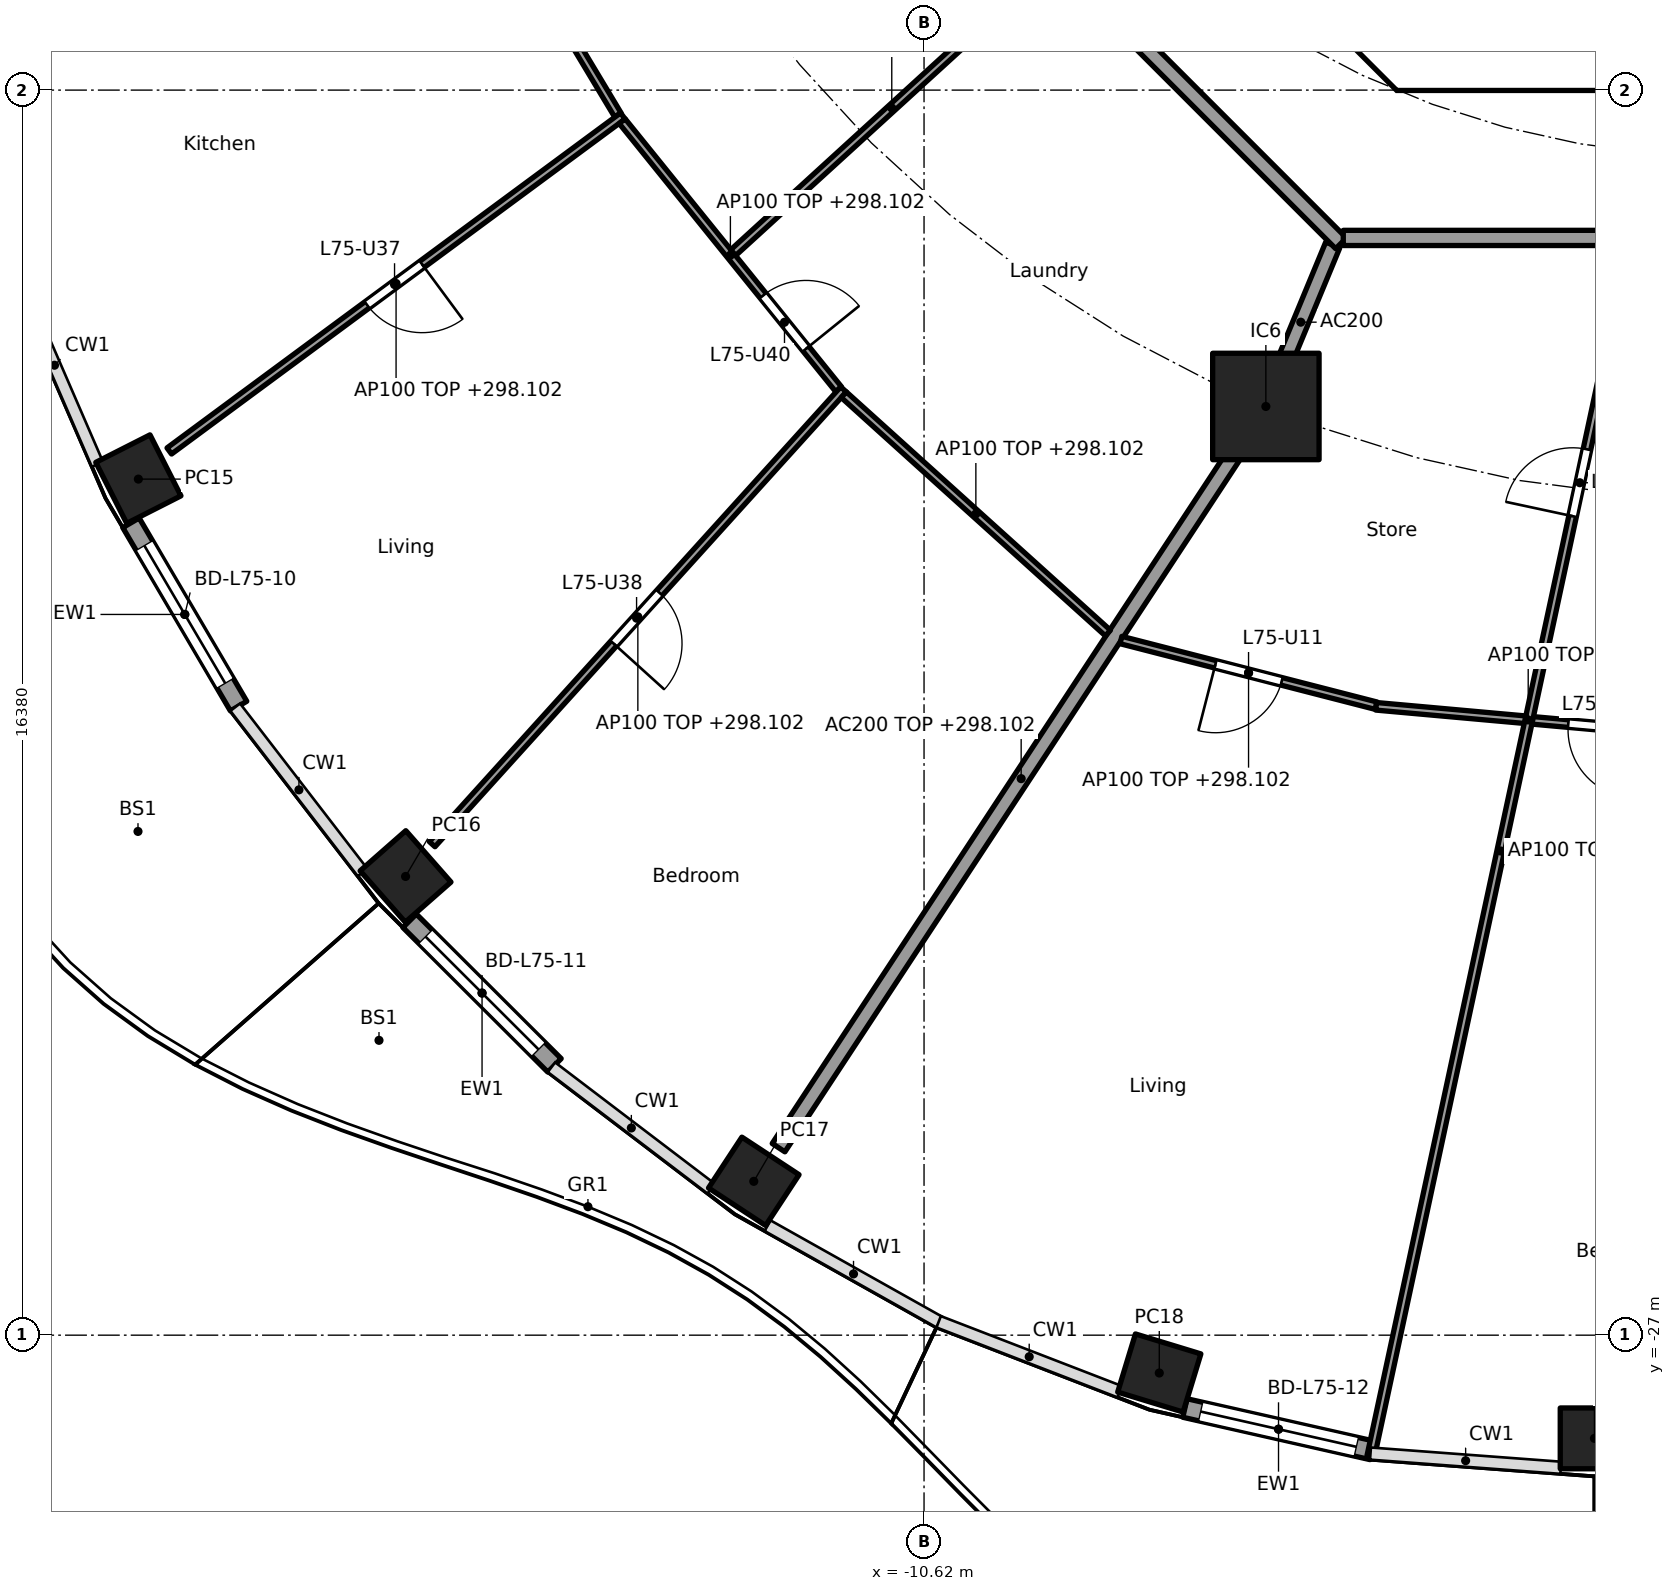
"""IFC4 building model, lengths in metres.
Left out: names, types, materials, properties, quantities, classifications, styles, units other than length and angle.
Written with IfcOpenShell. Run it as: python <this file> out.ifc"""

import sys

from ifc_helpers import new_model, si_unit, direction, frame, frame_2d, origin, origin_2d, place, context, subcontext, project, spatial, polyline, rectangle, hollow_rectangle, outline, extrude, element, fill, save


model = new_model("IFC4")
c1 = context("Model", 3, precision=1e-05, world=origin(), true_north=direction((0.0, 1.0)))
c2 = subcontext(c1, "Body", "Model", "MODEL_VIEW")
j1 = project(units=[si_unit("LENGTHUNIT", "METRE"), si_unit("PLANEANGLEUNIT", "RADIAN")], contexts=[c1])
p1 = place(None, origin())
s1 = spatial("IfcSite", under=j1, at=p1, CompositionType="ELEMENT")
p2 = place(p1, origin())
s2 = spatial("IfcBuilding", under=s1, at=p2, CompositionType="ELEMENT")
p3 = place(p2, frame((0.0, 0.0, 295.5)))
s3 = spatial("IfcBuildingStorey", under=s2, at=p3, CompositionType="ELEMENT", Elevation=295.5)
for number, where, z_axis, x_axis in (
    (1, (-20.957, -15.738, 0.0), (0.0, 0.0, 1.0), (0.452, -0.892, 0.0)),
    (2, (-17.441, -20.965, 0.0), (0.0, 0.0, 1.0), (0.66, -0.751, 0.0)),
    (3, (-12.86, -24.976, 0.0), (0.0, 0.0, 1.0), (0.836, -0.549, 0.0)),
    (4, (-7.525, -27.498, 0.0), (0.0, 0.0, 1.0), (0.957, -0.292, 0.0)),
    (5, (-1.8, -28.358, 0.0), (0.0, 0.0, 1.0), (1.0, 0.0, 0.0)),
):
    element("IfcColumn", number, at=place(p3, frame(where, z_axis=z_axis, x_axis=x_axis)), inside=s3, PredefinedType="COLUMN", context=c2, shape_type="SweptSolid", body=[
        extrude(hollow_rectangle(XDim=0.9, YDim=0.8, WallThickness=0.028, at=origin_2d()), origin(), (0.0, 0.0, 1.0), 3.7),
    ])
p4 = place(p3, frame((-6.123, -14.782, 0.0), z_axis=(0.0, 0.0, 1.0), x_axis=(1.0, 0.0, 0.0)))
e6 = element("IfcColumn", 6, at=p4, inside=s3, PredefinedType="COLUMN", context=c2, shape_type="SweptSolid", body=[
    extrude(rectangle(XDim=1.4, YDim=1.4, at=origin_2d()), origin(), (0.0, 0.0, 1.0), 3.7),
])
p5 = place(p3, frame((-19.638, -18.724, 0.0), z_axis=(0.0, 0.0, 1.0), x_axis=(-0.506371364425, 0.862315511452, 0.0)))
e7 = element("IfcWall", 7, at=p5, inside=s3, PredefinedType="SOLIDWALL", context=c2, shape_type="SweptSolid", body=[
    extrude(rectangle(XDim=2.796, YDim=0.25, at=frame_2d((1.398, 0.0))), origin(), (0.0, 0.0, 1.0), 3.28),
])
p6 = place(p5, frame((0.348, 0.0, 0.0)))
e8 = element("IfcOpeningElement", 8, at=p6, cuts=e7, PredefinedType="OPENING", context=c2, shape_type="SweptSolid", body=[
    extrude(rectangle(XDim=2.1, YDim=2.4, at=frame_2d((1.05, 1.2))), frame((0.0, 0.135, 0.0), z_axis=(0.0, -1.0, 0.0), x_axis=(1.0, 0.0, 0.0)), (0.0, 0.0, 1.0), 0.27),
])
p7 = place(p3, frame((-15.482, -23.45, 0.0), z_axis=(0.0, 0.0, 1.0), x_axis=(-0.707831739508, 0.706381078841, 0.0)))
e9 = element("IfcWall", 9, at=p7, inside=s3, PredefinedType="SOLIDWALL", context=c2, shape_type="SweptSolid", body=[
    extrude(rectangle(XDim=2.693, YDim=0.25, at=frame_2d((1.346, 0.0))), origin(), (0.0, 0.0, 1.0), 3.28),
])
p8 = place(p7, frame((0.296, 0.0, 0.0)))
e10 = element("IfcOpeningElement", 10, at=p8, cuts=e9, PredefinedType="OPENING", context=c2, shape_type="SweptSolid", body=[
    extrude(rectangle(XDim=2.1, YDim=2.4, at=frame_2d((1.05, 1.2))), frame((0.0, 0.135, 0.0), z_axis=(0.0, -1.0, 0.0), x_axis=(1.0, 0.0, 0.0)), (0.0, 0.0, 1.0), 0.27),
])
p9 = place(p3, frame((-4.725, -28.516, 0.0), z_axis=(0.0, 0.0, 1.0), x_axis=(-0.975319584032, 0.220797891756, 0.0)))
e11 = element("IfcWall", 11, at=p9, inside=s3, PredefinedType="SOLIDWALL", context=c2, shape_type="SweptSolid", body=[
    extrude(rectangle(XDim=2.525, YDim=0.25, at=frame_2d((1.263, 0.0))), origin(), (0.0, 0.0, 1.0), 3.28),
])
p10 = place(p9, frame((0.213, 0.0, 0.0)))
e12 = element("IfcOpeningElement", 12, at=p10, cuts=e11, PredefinedType="OPENING", context=c2, shape_type="SweptSolid", body=[
    extrude(rectangle(XDim=2.1, YDim=2.4, at=frame_2d((1.05, 1.2))), frame((0.0, 0.135, 0.0), z_axis=(0.0, -1.0, 0.0), x_axis=(1.0, 0.0, 0.0)), (0.0, 0.0, 1.0), 0.27),
])
p11 = place(p3, frame((-9.988, -4.613, 0.0), z_axis=(0.0, 0.0, 1.0), x_axis=(0.707106781187, -0.707106781187, 0.0)))
e13 = element("IfcWall", 13, at=p11, inside=s3, PredefinedType="SHEAR", context=c2, shape_type="SweptSolid", body=[
    extrude(rectangle(XDim=7.602, YDim=0.6, at=frame_2d((3.801, 0.0))), origin(), (0.0, 0.0, 1.0), 3.28),
])
p12 = place(p11, frame((6.151, 0.0, 0.0)))
e14 = element("IfcOpeningElement", 14, at=p12, cuts=e13, PredefinedType="OPENING", context=c2, shape_type="SweptSolid", body=[
    extrude(rectangle(XDim=1.1, YDim=2.1, at=frame_2d((0.55, 1.05))), frame((0.0, 0.31, 0.0), z_axis=(0.0, -1.0, 0.0), x_axis=(1.0, 0.0, 0.0)), (0.0, 0.0, 1.0), 0.62),
])
p13 = place(p3, origin())
e15 = element("IfcWall", 15, at=p13, inside=s3, PredefinedType="SHEAR", context=c2, shape_type="SweptSolid", body=[
    extrude(outline(polyline([(-4.152, -10.025), (4.152, -10.025), (4.401, -9.776), (4.825, -10.2), (4.401, -10.625), (-4.401, -10.625), (-4.825, -10.2), (-4.401, -9.776), (-4.152, -10.025)])), origin(), (0.0, 0.0, 1.0), 3.28),
])
p14 = place(p3, frame((-5.243, -12.657, 0.0), z_axis=(0.0, 0.0, 1.0), x_axis=(-0.382770106157, -0.923843626288, 0.0)))
e16 = element("IfcWall", 16, at=p14, inside=s3, PredefinedType="PARTITIONING", context=c2, shape_type="SweptSolid", body=[
    extrude(rectangle(XDim=2.199, YDim=0.2, at=frame_2d((1.1, 0.0))), origin(), (0.0, 0.0, 1.0), 3.28),
])
p15 = place(p3, frame((-6.151, -14.824, 0.0), z_axis=(0.0, 0.0, 1.0), x_axis=(-0.549345577828, -0.835595258556, 0.0)))
e17 = element("IfcWall", 17, at=p15, inside=s3, PredefinedType="PARTITIONING", context=c2, shape_type="SweptSolid", body=[
    extrude(rectangle(XDim=11.62, YDim=0.2, at=frame_2d((5.81, 0.0))), origin(), (0.0, 0.0, 1.0), 2.602),
])
p16 = place(p3, frame((-12.635, -5.134, 0.0), z_axis=(0.0, 0.0, 1.0), x_axis=(0.707106781187, -0.707106781187, 0.0)))
e18 = element("IfcWall", 18, at=p16, inside=s3, PredefinedType="PARTITIONING", context=c2, shape_type="SweptSolid", body=[
    extrude(rectangle(XDim=10.609, YDim=0.2, at=frame_2d((5.305, 0.0))), origin(), (0.0, 0.0, 1.0), 3.28),
])
p17 = place(p3, frame((-5.104, -12.565, 0.0), z_axis=(0.0, 0.0, 1.0), x_axis=(1.0, 0.0, 0.0)))
e19 = element("IfcWall", 19, at=p17, inside=s3, PredefinedType="PARTITIONING", context=c2, shape_type="SweptSolid", body=[
    extrude(rectangle(XDim=10.409, YDim=0.2, at=frame_2d((5.205, 0.0))), origin(), (0.0, 0.0, 1.0), 3.28),
])
p18 = place(p3, frame((-16.972, -7.08, 0.0), z_axis=(0.0, 0.0, 1.0), x_axis=(0.514989049311, -0.857196756346, 0.0)))
e20 = element("IfcWall", 20, at=p18, inside=s3, PredefinedType="PARTITIONING", context=c2, shape_type="SweptSolid", body=[
    extrude(rectangle(XDim=4.512, YDim=0.1, at=frame_2d((2.256, 0.0))), origin(), (0.0, 0.0, 1.0), 2.602),
])
p19 = place(p18, frame((1.806, 0.0, 0.0)))
e21 = element("IfcOpeningElement", 21, at=p19, cuts=e20, PredefinedType="OPENING", context=c2, shape_type="SweptSolid", body=[
    extrude(rectangle(XDim=0.9, YDim=2.1, at=frame_2d((0.45, 1.05))), frame((0.0, 0.06, 0.0), z_axis=(0.0, -1.0, 0.0), x_axis=(1.0, 0.0, 0.0)), (0.0, 0.0, 1.0), 0.12),
])
p20 = place(p3, frame((-14.582, -10.96, 0.0), z_axis=(0.0, 0.0, 1.0), x_axis=(-0.804405200554, -0.594081032623, 0.0)))
e22 = element("IfcWall", 22, at=p20, inside=s3, PredefinedType="PARTITIONING", context=c2, shape_type="SweptSolid", body=[
    extrude(rectangle(XDim=7.418, YDim=0.1, at=frame_2d((3.709, 0.0))), origin(), (0.0, 0.0, 1.0), 2.602),
])
p21 = place(p20, frame((3.284, 0.0, 0.0)))
e23 = element("IfcOpeningElement", 23, at=p21, cuts=e22, PredefinedType="OPENING", context=c2, shape_type="SweptSolid", body=[
    extrude(rectangle(XDim=0.9, YDim=2.1, at=frame_2d((0.45, 1.05))), frame((0.0, 0.06, 0.0), z_axis=(0.0, -1.0, 0.0), x_axis=(1.0, 0.0, 0.0)), (0.0, 0.0, 1.0), 0.12),
])
p22 = place(p3, frame((-14.591, -11.029, 0.0), z_axis=(0.0, 0.0, 1.0), x_axis=(0.628170338674, -0.778075848237, 0.0)))
e24 = element("IfcWall", 24, at=p22, inside=s3, PredefinedType="PARTITIONING", context=c2, shape_type="SweptSolid", body=[
    extrude(rectangle(XDim=4.532, YDim=0.1, at=frame_2d((2.266, 0.0))), origin(), (0.0, 0.0, 1.0), 2.602),
])
p23 = place(p22, frame((2.949, 0.0, 0.0)))
e25 = element("IfcOpeningElement", 25, at=p23, cuts=e24, PredefinedType="OPENING", context=c2, shape_type="SweptSolid", body=[
    extrude(rectangle(XDim=0.9, YDim=2.1, at=frame_2d((0.45, 1.05))), frame((0.0, 0.06, 0.0), z_axis=(0.0, -1.0, 0.0), x_axis=(1.0, 0.0, 0.0)), (0.0, 0.0, 1.0), 0.12),
])
p24 = place(p3, frame((-8.958, -8.952, 0.0), z_axis=(0.0, 0.0, 1.0), x_axis=(-0.73876526954, -0.673962815385, 0.0)))
e26 = element("IfcWall", 26, at=p24, inside=s3, PredefinedType="PARTITIONING", context=c2, shape_type="SweptSolid", body=[
    extrude(rectangle(XDim=5.647, YDim=0.1, at=frame_2d((2.824, 0.0))), origin(), (0.0, 0.0, 1.0), 2.527),
])
p25 = place(p3, frame((-11.679, -14.557, 0.0), z_axis=(0.0, 0.0, 1.0), x_axis=(-0.670800011545, -0.741638284146, 0.0)))
e27 = element("IfcWall", 27, at=p25, inside=s3, PredefinedType="PARTITIONING", context=c2, shape_type="SweptSolid", body=[
    extrude(rectangle(XDim=8.068, YDim=0.1, at=frame_2d((4.034, 0.0))), origin(), (0.0, 0.0, 1.0), 2.602),
])
p26 = place(p25, frame((3.609, 0.0, 0.0)))
e28 = element("IfcOpeningElement", 28, at=p26, cuts=e27, PredefinedType="OPENING", context=c2, shape_type="SweptSolid", body=[
    extrude(rectangle(XDim=0.9, YDim=2.1, at=frame_2d((0.45, 1.05))), frame((0.0, 0.06, 0.0), z_axis=(0.0, -1.0, 0.0), x_axis=(1.0, 0.0, 0.0)), (0.0, 0.0, 1.0), 0.12),
])
p27 = place(p3, frame((-11.676, -14.628, 0.0), z_axis=(0.0, 0.0, 1.0), x_axis=(0.74245829867, -0.669892285921, 0.0)))
e29 = element("IfcWall", 29, at=p27, inside=s3, PredefinedType="PARTITIONING", context=c2, shape_type="SweptSolid", body=[
    extrude(rectangle(XDim=4.68, YDim=0.1, at=frame_2d((2.34, 0.0))), origin(), (0.0, 0.0, 1.0), 2.602),
])
p28 = place(p3, frame((-8.03, -17.854, 0.0), z_axis=(0.0, 0.0, 1.0), x_axis=(0.968441967324, -0.249239154077, 0.0)))
e30 = element("IfcWall", 30, at=p28, inside=s3, PredefinedType="PARTITIONING", context=c2, shape_type="SweptSolid", body=[
    extrude(rectangle(XDim=3.468, YDim=0.1, at=frame_2d((1.734, 0.0))), origin(), (0.0, 0.0, 1.0), 2.602),
])
p29 = place(p28, frame((1.284, 0.0, 0.0)))
e31 = element("IfcOpeningElement", 31, at=p29, cuts=e30, PredefinedType="OPENING", context=c2, shape_type="SweptSolid", body=[
    extrude(rectangle(XDim=0.9, YDim=2.1, at=frame_2d((0.45, 1.05))), frame((0.0, 0.06, 0.0), z_axis=(0.0, -1.0, 0.0), x_axis=(1.0, 0.0, 0.0)), (0.0, 0.0, 1.0), 0.12),
])
p30 = place(p3, frame((-4.673, -18.727, 0.0), z_axis=(0.0, 0.0, 1.0), x_axis=(0.995982840882, -0.089544294447, 0.0)))
e32 = element("IfcWall", 32, at=p30, inside=s3, PredefinedType="PARTITIONING", context=c2, shape_type="SweptSolid", body=[
    extrude(rectangle(XDim=4.019, YDim=0.1, at=frame_2d((2.009, 0.0))), origin(), (0.0, 0.0, 1.0), 2.602),
])
p31 = place(p30, frame((2.539, 0.0, 0.0)))
e33 = element("IfcOpeningElement", 33, at=p31, cuts=e32, PredefinedType="OPENING", context=c2, shape_type="SweptSolid", body=[
    extrude(rectangle(XDim=0.9, YDim=2.1, at=frame_2d((0.45, 1.05))), frame((0.0, 0.06, 0.0), z_axis=(0.0, -1.0, 0.0), x_axis=(1.0, 0.0, 0.0)), (0.0, 0.0, 1.0), 0.12),
])
p32 = place(p3, frame((-1.322, -12.663, 0.0), z_axis=(0.0, 0.0, 1.0), x_axis=(-0.209957681159, -0.97771047459, 0.0)))
e34 = element("IfcWall", 34, at=p32, inside=s3, PredefinedType="PARTITIONING", context=c2, shape_type="SweptSolid", body=[
    extrude(rectangle(XDim=16.299, YDim=0.1, at=frame_2d((8.149, 0.0))), origin(), (0.0, 0.0, 1.0), 2.527),
])
p33 = place(p32, frame((2.744, 0.0, 0.0)))
e35 = element("IfcOpeningElement", 35, at=p33, cuts=e34, PredefinedType="OPENING", context=c2, shape_type="SweptSolid", body=[
    extrude(rectangle(XDim=0.9, YDim=2.1, at=frame_2d((0.45, 1.05))), frame((0.0, 0.06, 0.0), z_axis=(0.0, -1.0, 0.0), x_axis=(1.0, 0.0, 0.0)), (0.0, 0.0, 1.0), 0.12),
])
p34 = place(p6, origin())
e36 = element("IfcDoor", 36, at=p34, inside=s3, OperationType="SLIDING_TO_LEFT", PredefinedType="DOOR", context=c2, shape_type="SweptSolid", body=[
    extrude(rectangle(XDim=2.1, YDim=2.4, at=frame_2d((1.05, 1.2))), frame((0.0, 0.025, 0.0), z_axis=(0.0, -1.0, 0.0), x_axis=(1.0, 0.0, 0.0)), (0.0, 0.0, 1.0), 0.05),
])
fill(e8, e36)
p35 = place(p8, origin())
e37 = element("IfcDoor", 37, at=p35, inside=s3, OperationType="SLIDING_TO_LEFT", PredefinedType="DOOR", context=c2, shape_type="SweptSolid", body=[
    extrude(rectangle(XDim=2.1, YDim=2.4, at=frame_2d((1.05, 1.2))), frame((0.0, 0.025, 0.0), z_axis=(0.0, -1.0, 0.0), x_axis=(1.0, 0.0, 0.0)), (0.0, 0.0, 1.0), 0.05),
])
fill(e10, e37)
p36 = place(p10, origin())
e38 = element("IfcDoor", 38, at=p36, inside=s3, OperationType="SLIDING_TO_LEFT", PredefinedType="DOOR", context=c2, shape_type="SweptSolid", body=[
    extrude(rectangle(XDim=2.1, YDim=2.4, at=frame_2d((1.05, 1.2))), frame((0.0, 0.025, 0.0), z_axis=(0.0, -1.0, 0.0), x_axis=(1.0, 0.0, 0.0)), (0.0, 0.0, 1.0), 0.05),
])
fill(e12, e38)
p37 = place(p31, frame((0.9, 0.0, 0.0), x_axis=(-1.0, 0.0, 0.0)))
e39 = element("IfcDoor", 39, at=p37, inside=s3, OperationType="SINGLE_SWING_LEFT", PredefinedType="DOOR", context=c2, shape_type="SweptSolid", body=[
    extrude(rectangle(XDim=0.9, YDim=2.1, at=frame_2d((0.45, 1.05))), frame((0.0, 0.025, 0.0), z_axis=(0.0, -1.0, 0.0), x_axis=(1.0, 0.0, 0.0)), (0.0, 0.0, 1.0), 0.05),
])
fill(e33, e39)
p38 = place(p33, frame((0.9, 0.0, 0.0), x_axis=(-1.0, 0.0, 0.0)))
e40 = element("IfcDoor", 40, at=p38, inside=s3, OperationType="SINGLE_SWING_LEFT", PredefinedType="DOOR", context=c2, shape_type="SweptSolid", body=[
    extrude(rectangle(XDim=0.9, YDim=2.1, at=frame_2d((0.45, 1.05))), frame((0.0, 0.025, 0.0), z_axis=(0.0, -1.0, 0.0), x_axis=(1.0, 0.0, 0.0)), (0.0, 0.0, 1.0), 0.05),
])
fill(e35, e40)
p39 = place(p29, frame((0.9, 0.0, 0.0), x_axis=(-1.0, 0.0, 0.0)))
e41 = element("IfcDoor", 41, at=p39, inside=s3, OperationType="SINGLE_SWING_RIGHT", PredefinedType="DOOR", context=c2, shape_type="SweptSolid", body=[
    extrude(rectangle(XDim=0.9, YDim=2.1, at=frame_2d((0.45, 1.05))), frame((0.0, 0.025, 0.0), z_axis=(0.0, -1.0, 0.0), x_axis=(1.0, 0.0, 0.0)), (0.0, 0.0, 1.0), 0.05),
])
fill(e31, e41)
p40 = place(p21, origin())
e42 = element("IfcDoor", 42, at=p40, inside=s3, OperationType="SINGLE_SWING_LEFT", PredefinedType="DOOR", context=c2, shape_type="SweptSolid", body=[
    extrude(rectangle(XDim=0.9, YDim=2.1, at=frame_2d((0.45, 1.05))), frame((0.0, 0.025, 0.0), z_axis=(0.0, -1.0, 0.0), x_axis=(1.0, 0.0, 0.0)), (0.0, 0.0, 1.0), 0.05),
])
fill(e23, e42)
p41 = place(p26, origin())
e43 = element("IfcDoor", 43, at=p41, inside=s3, OperationType="SINGLE_SWING_RIGHT", PredefinedType="DOOR", context=c2, shape_type="SweptSolid", body=[
    extrude(rectangle(XDim=0.9, YDim=2.1, at=frame_2d((0.45, 1.05))), frame((0.0, 0.025, 0.0), z_axis=(0.0, -1.0, 0.0), x_axis=(1.0, 0.0, 0.0)), (0.0, 0.0, 1.0), 0.05),
])
fill(e28, e43)
p42 = place(p23, origin())
e44 = element("IfcDoor", 44, at=p42, inside=s3, OperationType="SINGLE_SWING_RIGHT", PredefinedType="DOOR", context=c2, shape_type="SweptSolid", body=[
    extrude(rectangle(XDim=0.9, YDim=2.1, at=frame_2d((0.45, 1.05))), frame((0.0, 0.025, 0.0), z_axis=(0.0, -1.0, 0.0), x_axis=(1.0, 0.0, 0.0)), (0.0, 0.0, 1.0), 0.05),
])
fill(e25, e44)
save(model, sys.argv[1])
